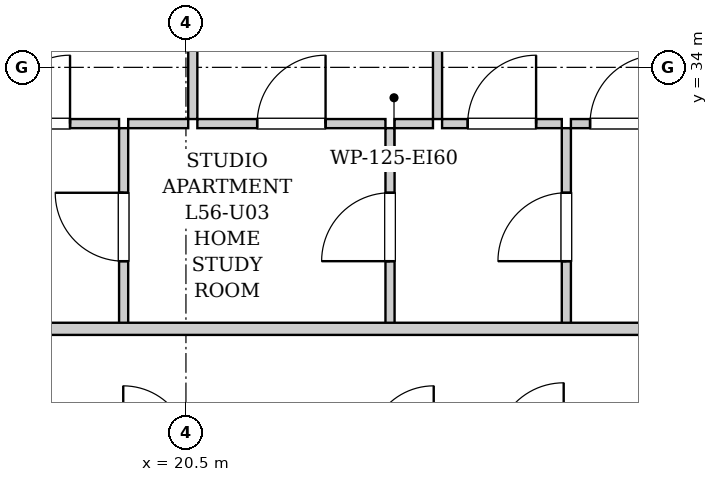
"""IFC4 building model, lengths in metres.
Left out: names, types, materials, properties, quantities, classifications, styles, units other than length and angle.
Written with IfcOpenShell. Run it as: python <this file> out.ifc"""

import sys

from ifc_helpers import new_model, si_unit, direction, frame, frame_2d, origin, place, context, subcontext, project, spatial, rectangle, extrude, element, fill, save


model = new_model("IFC4")
c1 = context("Model", 3, precision=1e-05, world=origin(), true_north=direction((0.0, 1.0)))
c2 = subcontext(c1, "Body", "Model", "MODEL_VIEW")
j1 = project(units=[si_unit("LENGTHUNIT", "METRE"), si_unit("PLANEANGLEUNIT", "RADIAN")], contexts=[c1])
p1 = place(None, origin())
s1 = spatial("IfcSite", under=j1, at=p1, CompositionType="ELEMENT")
p2 = place(p1, origin())
s2 = spatial("IfcBuilding", under=s1, at=p2, CompositionType="ELEMENT")
p3 = place(p2, frame((0.0, 0.0, 194.2)))
s3 = spatial("IfcBuildingStorey", under=s2, at=p3, CompositionType="ELEMENT", Elevation=194.2)
p4 = place(p3, frame((19.68, 30.6, 0.0), z_axis=(0.0, 0.0, 1.0), x_axis=(0.0, 1.0, 0.0)))
e1 = element("IfcWall", 1, at=p4, inside=s3, PredefinedType="PARTITIONING", context=c2, shape_type="SweptSolid", body=[
    extrude(rectangle(XDim=2.6, YDim=0.12, at=frame_2d((1.3, 0.0))), origin(), (0.0, 0.0, 1.0), 3.04),
])
p5 = place(p4, frame((0.85, 0.0, 0.0)))
e2 = element("IfcOpeningElement", 2, at=p5, cuts=e1, PredefinedType="OPENING", context=c2, shape_type="SweptSolid", body=[
    extrude(rectangle(XDim=0.9, YDim=2.05, at=frame_2d((0.45, 1.025))), frame((0.0, 0.07, 0.0), z_axis=(0.0, -1.0, 0.0), x_axis=(1.0, 0.0, 0.0)), (0.0, 0.0, 1.0), 0.14),
])
p6 = place(p3, frame((17.43, 33.26, 0.0), z_axis=(0.0, 0.0, 1.0), x_axis=(1.0, 0.0, 0.0)))
e3 = element("IfcWall", 3, at=p6, inside=s3, PredefinedType="PARTITIONING", context=c2, shape_type="SweptSolid", body=[
    extrude(rectangle(XDim=2.19, YDim=0.12, at=frame_2d((1.095, 0.0))), origin(), (0.0, 0.0, 1.0), 3.04),
])
p7 = place(p6, frame((0.645, 0.0, 0.0)))
e4 = element("IfcOpeningElement", 4, at=p7, cuts=e3, PredefinedType="OPENING", context=c2, shape_type="SweptSolid", body=[
    extrude(rectangle(XDim=0.9, YDim=2.05, at=frame_2d((0.45, 1.025))), frame((0.0, 0.07, 0.0), z_axis=(0.0, -1.0, 0.0), x_axis=(1.0, 0.0, 0.0)), (0.0, 0.0, 1.0), 0.14),
])
p8 = place(p3, frame((23.185, 30.6, 0.0), z_axis=(0.0, 0.0, 1.0), x_axis=(0.0, 1.0, 0.0)))
e5 = element("IfcWall", 5, at=p8, inside=s3, PredefinedType="PARTITIONING", context=c2, shape_type="SweptSolid", body=[
    extrude(rectangle(XDim=2.6, YDim=0.12, at=frame_2d((1.3, 0.0))), origin(), (0.0, 0.0, 1.0), 3.04),
])
p9 = place(p8, frame((0.85, 0.0, 0.0)))
e6 = element("IfcOpeningElement", 6, at=p9, cuts=e5, PredefinedType="OPENING", context=c2, shape_type="SweptSolid", body=[
    extrude(rectangle(XDim=0.9, YDim=2.05, at=frame_2d((0.45, 1.025))), frame((0.0, 0.07, 0.0), z_axis=(0.0, -1.0, 0.0), x_axis=(1.0, 0.0, 0.0)), (0.0, 0.0, 1.0), 0.14),
])
p10 = place(p3, frame((19.74, 33.26, 0.0), z_axis=(0.0, 0.0, 1.0), x_axis=(1.0, 0.0, 0.0)))
e7 = element("IfcWall", 7, at=p10, inside=s3, PredefinedType="PARTITIONING", context=c2, shape_type="SweptSolid", body=[
    extrude(rectangle(XDim=0.79, YDim=0.12, at=frame_2d((0.395, 0.0))), origin(), (0.0, 0.0, 1.0), 3.04),
])
p11 = place(p3, frame((20.65, 33.26, 0.0), z_axis=(0.0, 0.0, 1.0), x_axis=(1.0, 0.0, 0.0)))
e8 = element("IfcWall", 8, at=p11, inside=s3, PredefinedType="PARTITIONING", context=c2, shape_type="SweptSolid", body=[
    extrude(rectangle(XDim=2.475, YDim=0.12, at=frame_2d((1.238, 0.0))), origin(), (0.0, 0.0, 1.0), 3.04),
])
p12 = place(p11, frame((0.787, 0.0, 0.0)))
e9 = element("IfcOpeningElement", 9, at=p12, cuts=e8, PredefinedType="OPENING", context=c2, shape_type="SweptSolid", body=[
    extrude(rectangle(XDim=0.9, YDim=2.05, at=frame_2d((0.45, 1.025))), frame((0.0, 0.07, 0.0), z_axis=(0.0, -1.0, 0.0), x_axis=(1.0, 0.0, 0.0)), (0.0, 0.0, 1.0), 0.14),
])
p13 = place(p3, frame((25.505, 30.6, 0.0), z_axis=(0.0, 0.0, 1.0), x_axis=(0.0, 1.0, 0.0)))
e10 = element("IfcWall", 10, at=p13, inside=s3, PredefinedType="PARTITIONING", context=c2, shape_type="SweptSolid", body=[
    extrude(rectangle(XDim=2.6, YDim=0.12, at=frame_2d((1.3, 0.0))), origin(), (0.0, 0.0, 1.0), 3.04),
])
p14 = place(p13, frame((0.85, 0.0, 0.0)))
e11 = element("IfcOpeningElement", 11, at=p14, cuts=e10, PredefinedType="OPENING", context=c2, shape_type="SweptSolid", body=[
    extrude(rectangle(XDim=0.9, YDim=2.05, at=frame_2d((0.45, 1.025))), frame((0.0, 0.07, 0.0), z_axis=(0.0, -1.0, 0.0), x_axis=(1.0, 0.0, 0.0)), (0.0, 0.0, 1.0), 0.14),
])
p15 = place(p3, frame((23.245, 33.26, 0.0), z_axis=(0.0, 0.0, 1.0), x_axis=(1.0, 0.0, 0.0)))
e12 = element("IfcWall", 12, at=p15, inside=s3, PredefinedType="PARTITIONING", context=c2, shape_type="SweptSolid", body=[
    extrude(rectangle(XDim=0.505, YDim=0.12, at=frame_2d((0.252, 0.0))), origin(), (0.0, 0.0, 1.0), 3.04),
])
p16 = place(p3, frame((23.87, 33.26, 0.0), z_axis=(0.0, 0.0, 1.0), x_axis=(1.0, 0.0, 0.0)))
e13 = element("IfcWall", 13, at=p16, inside=s3, PredefinedType="PARTITIONING", context=c2, shape_type="SweptSolid", body=[
    extrude(rectangle(XDim=1.575, YDim=0.12, at=frame_2d((0.788, 0.0))), origin(), (0.0, 0.0, 1.0), 3.04),
])
p17 = place(p16, frame((0.337, 0.0, 0.0)))
e14 = element("IfcOpeningElement", 14, at=p17, cuts=e13, PredefinedType="OPENING", context=c2, shape_type="SweptSolid", body=[
    extrude(rectangle(XDim=0.9, YDim=2.05, at=frame_2d((0.45, 1.025))), frame((0.0, 0.07, 0.0), z_axis=(0.0, -1.0, 0.0), x_axis=(1.0, 0.0, 0.0)), (0.0, 0.0, 1.0), 0.14),
])
p18 = place(p3, frame((25.565, 33.26, 0.0), z_axis=(0.0, 0.0, 1.0), x_axis=(1.0, 0.0, 0.0)))
e15 = element("IfcWall", 15, at=p18, inside=s3, PredefinedType="PARTITIONING", context=c2, shape_type="SweptSolid", body=[
    extrude(rectangle(XDim=1.405, YDim=0.12, at=frame_2d((0.703, 0.0))), origin(), (0.0, 0.0, 1.0), 3.04),
])
p19 = place(p18, frame((0.252, 0.0, 0.0)))
e16 = element("IfcOpeningElement", 16, at=p19, cuts=e15, PredefinedType="OPENING", context=c2, shape_type="SweptSolid", body=[
    extrude(rectangle(XDim=0.9, YDim=2.05, at=frame_2d((0.45, 1.025))), frame((0.0, 0.07, 0.0), z_axis=(0.0, -1.0, 0.0), x_axis=(1.0, 0.0, 0.0)), (0.0, 0.0, 1.0), 0.14),
])
p20 = place(p3, frame((20.59, 33.32, 0.0), z_axis=(0.0, 0.0, 1.0), x_axis=(0.0, 1.0, 0.0)))
e17 = element("IfcWall", 17, at=p20, inside=s3, PredefinedType="PARTITIONING", context=c2, shape_type="SweptSolid", body=[
    extrude(rectangle(XDim=6.6, YDim=0.12, at=frame_2d((3.3, 0.0))), origin(), (0.0, 0.0, 1.0), 3.04),
])
p21 = place(p20, frame((2.835, 0.0, 0.0)))
e18 = element("IfcOpeningElement", 18, at=p21, cuts=e17, PredefinedType="OPENING", context=c2, shape_type="SweptSolid", body=[
    extrude(rectangle(XDim=0.9, YDim=2.05, at=frame_2d((0.45, 1.025))), frame((0.0, 0.07, 0.0), z_axis=(0.0, -1.0, 0.0), x_axis=(1.0, 0.0, 0.0)), (0.0, 0.0, 1.0), 0.14),
])
p22 = place(p3, frame((23.81, 33.32, 0.0), z_axis=(0.0, 0.0, 1.0), x_axis=(0.0, 1.0, 0.0)))
e19 = element("IfcWall", 19, at=p22, inside=s3, PredefinedType="PARTITIONING", context=c2, shape_type="SweptSolid", body=[
    extrude(rectangle(XDim=6.6, YDim=0.12, at=frame_2d((3.3, 0.0))), origin(), (0.0, 0.0, 1.0), 3.04),
])
p23 = place(p22, frame((2.835, 0.0, 0.0)))
e20 = element("IfcOpeningElement", 20, at=p23, cuts=e19, PredefinedType="OPENING", context=c2, shape_type="SweptSolid", body=[
    extrude(rectangle(XDim=0.9, YDim=2.05, at=frame_2d((0.45, 1.025))), frame((0.0, 0.07, 0.0), z_axis=(0.0, -1.0, 0.0), x_axis=(1.0, 0.0, 0.0)), (0.0, 0.0, 1.0), 0.14),
])
p24 = place(p3, frame((13.15, 30.56, 0.0), z_axis=(0.0, 0.0, 1.0), x_axis=(1.0, 0.0, 0.0)))
e21 = element("IfcWall", 21, at=p24, inside=s3, PredefinedType="PARTITIONING", context=c2, shape_type="SweptSolid", body=[
    extrude(rectangle(XDim=24.6, YDim=0.16, at=frame_2d((12.3, 0.0))), origin(), (0.0, 0.0, 1.0), 3.04),
])
p25 = place(p24, frame((3.115, 0.0, 0.0)))
e22 = element("IfcOpeningElement", 22, at=p25, cuts=e21, PredefinedType="OPENING", context=c2, shape_type="SweptSolid", body=[
    extrude(rectangle(XDim=0.95, YDim=2.1, at=frame_2d((0.475, 1.05))), frame((0.0, 0.09, 0.0), z_axis=(0.0, -1.0, 0.0), x_axis=(1.0, 0.0, 0.0)), (0.0, 0.0, 1.0), 0.18),
])
p26 = place(p5, origin())
e23 = element("IfcDoor", 23, at=p26, inside=s3, OperationType="SINGLE_SWING_RIGHT", PredefinedType="DOOR", context=c2, shape_type="SweptSolid", body=[
    extrude(rectangle(XDim=0.9, YDim=2.05, at=frame_2d((0.45, 1.025))), frame((0.0, 0.025, 0.0), z_axis=(0.0, -1.0, 0.0), x_axis=(1.0, 0.0, 0.0)), (0.0, 0.0, 1.0), 0.05),
])
fill(e2, e23)
p27 = place(p7, origin())
e24 = element("IfcDoor", 24, at=p27, inside=s3, OperationType="SINGLE_SWING_RIGHT", PredefinedType="DOOR", context=c2, shape_type="SweptSolid", body=[
    extrude(rectangle(XDim=0.9, YDim=2.05, at=frame_2d((0.45, 1.025))), frame((0.0, 0.025, 0.0), z_axis=(0.0, -1.0, 0.0), x_axis=(1.0, 0.0, 0.0)), (0.0, 0.0, 1.0), 0.05),
])
fill(e4, e24)
p28 = place(p9, origin())
e25 = element("IfcDoor", 25, at=p28, inside=s3, OperationType="SINGLE_SWING_LEFT", PredefinedType="DOOR", context=c2, shape_type="SweptSolid", body=[
    extrude(rectangle(XDim=0.9, YDim=2.05, at=frame_2d((0.45, 1.025))), frame((0.0, 0.025, 0.0), z_axis=(0.0, -1.0, 0.0), x_axis=(1.0, 0.0, 0.0)), (0.0, 0.0, 1.0), 0.05),
])
fill(e6, e25)
p29 = place(p12, origin())
e26 = element("IfcDoor", 26, at=p29, inside=s3, OperationType="SINGLE_SWING_RIGHT", PredefinedType="DOOR", context=c2, shape_type="SweptSolid", body=[
    extrude(rectangle(XDim=0.9, YDim=2.05, at=frame_2d((0.45, 1.025))), frame((0.0, 0.025, 0.0), z_axis=(0.0, -1.0, 0.0), x_axis=(1.0, 0.0, 0.0)), (0.0, 0.0, 1.0), 0.05),
])
fill(e9, e26)
p30 = place(p14, origin())
e27 = element("IfcDoor", 27, at=p30, inside=s3, OperationType="SINGLE_SWING_LEFT", PredefinedType="DOOR", context=c2, shape_type="SweptSolid", body=[
    extrude(rectangle(XDim=0.9, YDim=2.05, at=frame_2d((0.45, 1.025))), frame((0.0, 0.025, 0.0), z_axis=(0.0, -1.0, 0.0), x_axis=(1.0, 0.0, 0.0)), (0.0, 0.0, 1.0), 0.05),
])
fill(e11, e27)
p31 = place(p17, origin())
e28 = element("IfcDoor", 28, at=p31, inside=s3, OperationType="SINGLE_SWING_RIGHT", PredefinedType="DOOR", context=c2, shape_type="SweptSolid", body=[
    extrude(rectangle(XDim=0.9, YDim=2.05, at=frame_2d((0.45, 1.025))), frame((0.0, 0.025, 0.0), z_axis=(0.0, -1.0, 0.0), x_axis=(1.0, 0.0, 0.0)), (0.0, 0.0, 1.0), 0.05),
])
fill(e14, e28)
p32 = place(p19, origin())
e29 = element("IfcDoor", 29, at=p32, inside=s3, OperationType="SINGLE_SWING_RIGHT", PredefinedType="DOOR", context=c2, shape_type="SweptSolid", body=[
    extrude(rectangle(XDim=0.9, YDim=2.05, at=frame_2d((0.45, 1.025))), frame((0.0, 0.025, 0.0), z_axis=(0.0, -1.0, 0.0), x_axis=(1.0, 0.0, 0.0)), (0.0, 0.0, 1.0), 0.05),
])
fill(e16, e29)
save(model, sys.argv[1])
